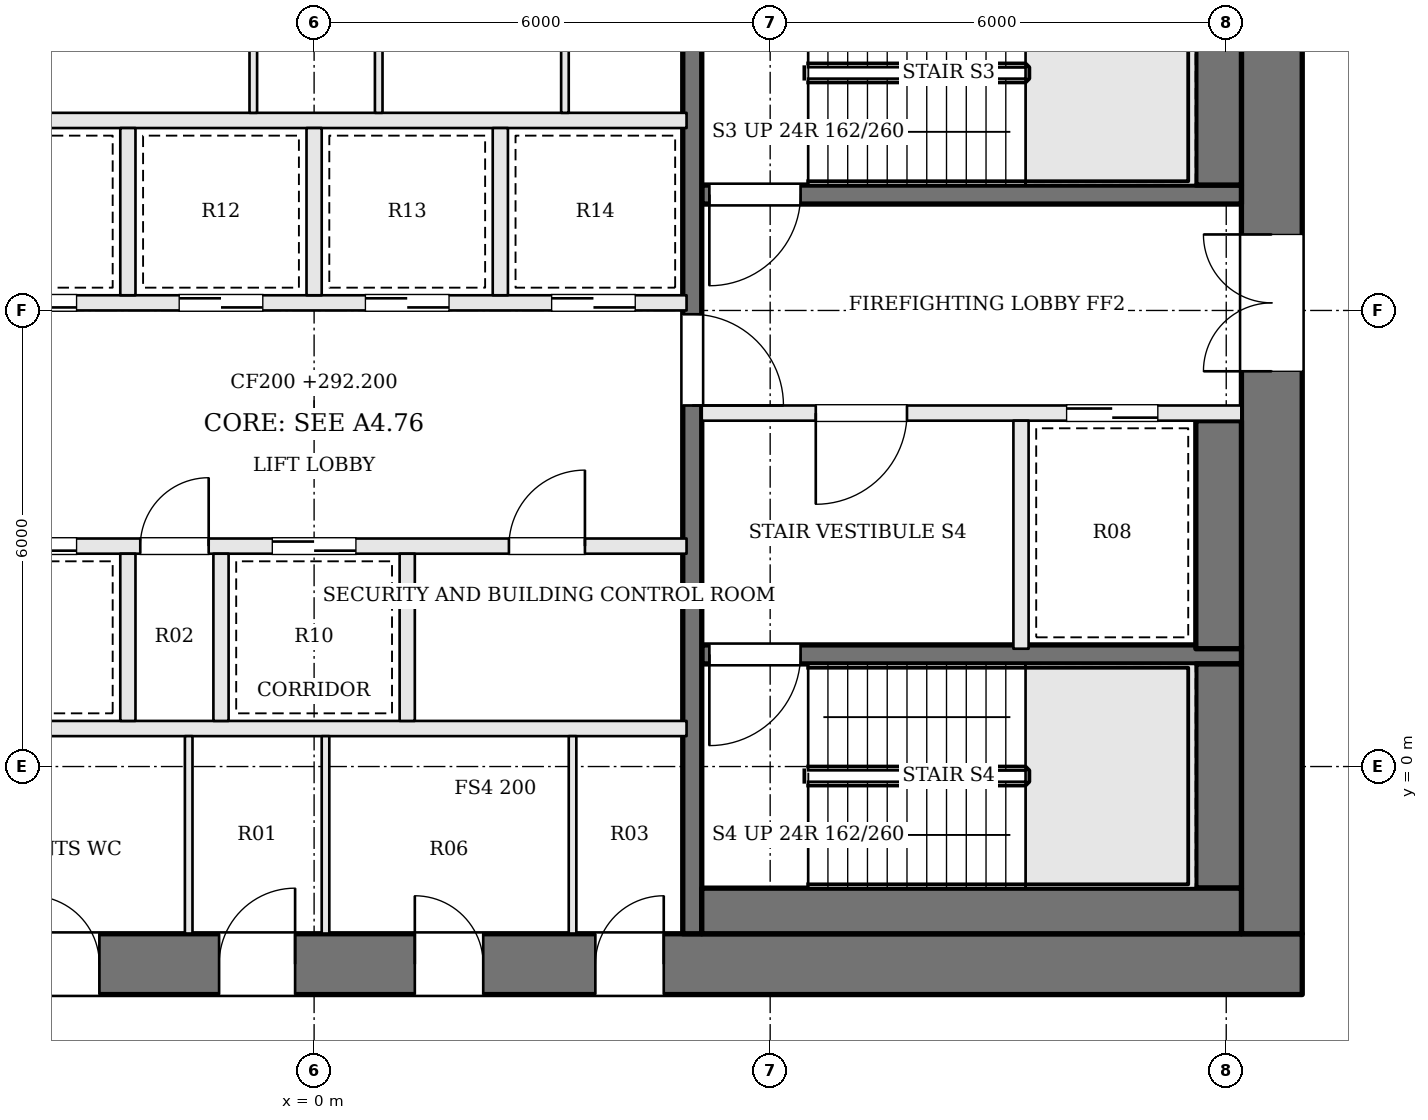
"""IFC4 building model, lengths in metres.
Left out: names, types, materials, properties, quantities, classifications, styles, units other than length and angle.
Written with IfcOpenShell. Run it as: python <this file> out.ifc"""

import sys

from ifc_helpers import new_model, si_unit, direction, frame, frame_2d, origin, place, context, subcontext, project, spatial, rectangle, extrude, element, fill, save


model = new_model("IFC4")
c1 = context("Model", 3, precision=1e-05, world=origin(), true_north=direction((0.0, 1.0)))
c2 = subcontext(c1, "Body", "Model", "MODEL_VIEW")
j1 = project(units=[si_unit("LENGTHUNIT", "METRE"), si_unit("PLANEANGLEUNIT", "RADIAN")], contexts=[c1])
p1 = place(None, origin())
s1 = spatial("IfcSite", under=j1, at=p1, CompositionType="ELEMENT")
p2 = place(p1, origin())
s2 = spatial("IfcBuilding", under=s1, at=p2, CompositionType="ELEMENT")
p3 = place(p2, frame((0.0, 0.0, 292.2)))
s3 = spatial("IfcBuildingStorey", under=s2, at=p3, CompositionType="ELEMENT", Elevation=292.2)
p4 = place(p3, frame((-13.0, -2.6, 0.0), z_axis=(0.0, 0.0, 1.0), x_axis=(1.0, 0.0, 0.0)))
e1 = element("IfcWall", 1, at=p4, inside=s3, PredefinedType="SHEAR", context=c2, shape_type="SweptSolid", body=[
    extrude(rectangle(XDim=26.0, YDim=0.8, at=frame_2d((13.0, 0.0))), origin(), (0.0, 0.0, 1.0), 3.9),
])
p5 = place(p4, frame((9.275, 0.0, 0.0)))
e2 = element("IfcOpeningElement", 2, at=p5, cuts=e1, PredefinedType="OPENING", context=c2, shape_type="SweptSolid", body=[
    extrude(rectangle(XDim=0.9, YDim=2.1, at=frame_2d((0.45, 1.05))), frame((0.0, 0.41, 0.0), z_axis=(0.0, -1.0, 0.0), x_axis=(1.0, 0.0, 0.0)), (0.0, 0.0, 1.0), 0.82),
])
p6 = place(p4, frame((11.75, 0.0, 0.0)))
e3 = element("IfcOpeningElement", 3, at=p6, cuts=e1, PredefinedType="OPENING", context=c2, shape_type="SweptSolid", body=[
    extrude(rectangle(XDim=1.0, YDim=2.1, at=frame_2d((0.5, 1.05))), frame((0.0, 0.41, 0.0), z_axis=(0.0, -1.0, 0.0), x_axis=(1.0, 0.0, 0.0)), (0.0, 0.0, 1.0), 0.82),
])
p7 = place(p4, frame((14.325, 0.0, 0.0)))
e4 = element("IfcOpeningElement", 4, at=p7, cuts=e1, PredefinedType="OPENING", context=c2, shape_type="SweptSolid", body=[
    extrude(rectangle(XDim=0.9, YDim=2.1, at=frame_2d((0.45, 1.05))), frame((0.0, 0.41, 0.0), z_axis=(0.0, -1.0, 0.0), x_axis=(1.0, 0.0, 0.0)), (0.0, 0.0, 1.0), 0.82),
])
p8 = place(p4, frame((16.7, 0.0, 0.0)))
e5 = element("IfcOpeningElement", 5, at=p8, cuts=e1, PredefinedType="OPENING", context=c2, shape_type="SweptSolid", body=[
    extrude(rectangle(XDim=0.9, YDim=2.1, at=frame_2d((0.45, 1.05))), frame((0.0, 0.41, 0.0), z_axis=(0.0, -1.0, 0.0), x_axis=(1.0, 0.0, 0.0)), (0.0, 0.0, 1.0), 0.82),
])
p9 = place(p3, frame((12.6, -2.2, 0.0), z_axis=(0.0, 0.0, 1.0), x_axis=(0.0, 1.0, 0.0)))
e6 = element("IfcWall", 6, at=p9, inside=s3, PredefinedType="SHEAR", context=c2, shape_type="SweptSolid", body=[
    extrude(rectangle(XDim=13.4, YDim=0.8, at=frame_2d((6.7, 0.0))), origin(), (0.0, 0.0, 1.0), 3.9),
])
p10 = place(p9, frame((7.4, 0.0, 0.0)))
e7 = element("IfcOpeningElement", 7, at=p10, cuts=e6, PredefinedType="OPENING", context=c2, shape_type="SweptSolid", body=[
    extrude(rectangle(XDim=1.8, YDim=2.1, at=frame_2d((0.9, 1.05))), frame((0.0, 0.41, 0.0), z_axis=(0.0, -1.0, 0.0), x_axis=(1.0, 0.0, 0.0)), (0.0, 0.0, 1.0), 0.82),
])
p11 = place(p3, frame((12.2, 7.525, 0.0), z_axis=(0.0, 0.0, 1.0), x_axis=(-1.0, 0.0, 0.0)))
e8 = element("IfcWall", 8, at=p11, inside=s3, PredefinedType="SOLIDWALL", context=c2, shape_type="SweptSolid", body=[
    extrude(rectangle(XDim=7.1, YDim=0.25, at=frame_2d((3.55, 0.0))), origin(), (0.0, 0.0, 1.0), 3.7),
])
p12 = place(p11, frame((5.8, 0.0, 0.0)))
e9 = element("IfcOpeningElement", 9, at=p12, cuts=e8, PredefinedType="OPENING", context=c2, shape_type="SweptSolid", body=[
    extrude(rectangle(XDim=1.2, YDim=2.1, at=frame_2d((0.6, 1.05))), frame((0.0, 0.135, 0.0), z_axis=(0.0, -1.0, 0.0), x_axis=(1.0, 0.0, 0.0)), (0.0, 0.0, 1.0), 0.27),
])
p13 = place(p3, frame((12.2, 4.65, 0.0), z_axis=(0.0, 0.0, 1.0), x_axis=(-1.0, 0.0, 0.0)))
e10 = element("IfcWall", 10, at=p13, inside=s3, PredefinedType="SOLIDWALL", context=c2, shape_type="SweptSolid", body=[
    extrude(rectangle(XDim=7.1, YDim=0.2, at=frame_2d((3.55, 0.0))), origin(), (0.0, 0.0, 1.0), 3.7),
])
p14 = place(p13, frame((4.4, 0.0, 0.0)))
e11 = element("IfcOpeningElement", 11, at=p14, cuts=e10, PredefinedType="OPENING", context=c2, shape_type="SweptSolid", body=[
    extrude(rectangle(XDim=1.2, YDim=2.1, at=frame_2d((0.6, 1.05))), frame((0.0, 0.11, 0.0), z_axis=(0.0, -1.0, 0.0), x_axis=(1.0, 0.0, 0.0)), (0.0, 0.0, 1.0), 0.22),
])
p15 = place(p13, frame((1.1, 0.0, 0.0)))
e12 = element("IfcOpeningElement", 12, at=p15, cuts=e10, PredefinedType="OPENING", context=c2, shape_type="SweptSolid", body=[
    extrude(rectangle(XDim=1.2, YDim=2.1, at=frame_2d((0.6, 1.05))), frame((0.0, 0.11, 0.0), z_axis=(0.0, -1.0, 0.0), x_axis=(1.0, 0.0, 0.0)), (0.0, 0.0, 1.0), 0.22),
])
p16 = place(p3, frame((12.2, 1.475, 0.0), z_axis=(0.0, 0.0, 1.0), x_axis=(-1.0, 0.0, 0.0)))
e13 = element("IfcWall", 13, at=p16, inside=s3, PredefinedType="SOLIDWALL", context=c2, shape_type="SweptSolid", body=[
    extrude(rectangle(XDim=7.1, YDim=0.25, at=frame_2d((3.55, 0.0))), origin(), (0.0, 0.0, 1.0), 3.7),
])
p17 = place(p16, frame((5.8, 0.0, 0.0)))
e14 = element("IfcOpeningElement", 14, at=p17, cuts=e13, PredefinedType="OPENING", context=c2, shape_type="SweptSolid", body=[
    extrude(rectangle(XDim=1.2, YDim=2.1, at=frame_2d((0.6, 1.05))), frame((0.0, 0.135, 0.0), z_axis=(0.0, -1.0, 0.0), x_axis=(1.0, 0.0, 0.0)), (0.0, 0.0, 1.0), 0.27),
])
p18 = place(p3, frame((9.3, 4.55, 0.0), z_axis=(0.0, 0.0, 1.0), x_axis=(0.0, -1.0, 0.0)))
e15 = element("IfcWall", 15, at=p18, inside=s3, PredefinedType="SOLIDWALL", context=c2, shape_type="SweptSolid", body=[
    extrude(rectangle(XDim=3.0, YDim=0.2, at=frame_2d((1.5, 0.0))), origin(), (0.0, 0.0, 1.0), 3.7),
])
p19 = place(p3, frame((4.975, 11.2, 0.0), z_axis=(0.0, 0.0, 1.0), x_axis=(0.0, -1.0, 0.0)))
e16 = element("IfcWall", 16, at=p19, inside=s3, PredefinedType="SOLIDWALL", context=c2, shape_type="SweptSolid", body=[
    extrude(rectangle(XDim=13.4, YDim=0.25, at=frame_2d((6.7, 0.0))), origin(), (0.0, 0.0, 1.0), 3.7),
])
p20 = place(p19, frame((5.25, 0.0, 0.0)))
e17 = element("IfcOpeningElement", 17, at=p20, cuts=e16, PredefinedType="OPENING", context=c2, shape_type="SweptSolid", body=[
    extrude(rectangle(XDim=1.2, YDim=2.1, at=frame_2d((0.6, 1.05))), frame((0.0, 0.135, 0.0), z_axis=(0.0, -1.0, 0.0), x_axis=(1.0, 0.0, 0.0)), (0.0, 0.0, 1.0), 0.27),
])
p21 = place(p3, frame((11.9, 10.6, 0.0), z_axis=(0.0, 0.0, 1.0), x_axis=(0.0, -1.0, 0.0)))
e18 = element("IfcWall", 18, at=p21, inside=s3, PredefinedType="SOLIDWALL", context=c2, shape_type="SweptSolid", body=[
    extrude(rectangle(XDim=2.95, YDim=0.6, at=frame_2d((1.475, 0.0))), origin(), (0.0, 0.0, 1.0), 3.7),
])
p22 = place(p3, frame((11.9, 4.55, 0.0), z_axis=(0.0, 0.0, 1.0), x_axis=(0.0, -1.0, 0.0)))
e19 = element("IfcWall", 19, at=p22, inside=s3, PredefinedType="SOLIDWALL", context=c2, shape_type="SweptSolid", body=[
    extrude(rectangle(XDim=3.0, YDim=0.6, at=frame_2d((1.5, 0.0))), origin(), (0.0, 0.0, 1.0), 3.7),
])
p23 = place(p3, frame((11.9, 1.35, 0.0), z_axis=(0.0, 0.0, 1.0), x_axis=(0.0, -1.0, 0.0)))
e20 = element("IfcWall", 20, at=p23, inside=s3, PredefinedType="SOLIDWALL", context=c2, shape_type="SweptSolid", body=[
    extrude(rectangle(XDim=2.95, YDim=0.6, at=frame_2d((1.475, 0.0))), origin(), (0.0, 0.0, 1.0), 3.7),
])
p24 = place(p3, frame((12.2, -1.9, 0.0), z_axis=(0.0, 0.0, 1.0), x_axis=(-1.0, 0.0, 0.0)))
e21 = element("IfcWall", 21, at=p24, inside=s3, PredefinedType="SOLIDWALL", context=c2, shape_type="SweptSolid", body=[
    extrude(rectangle(XDim=7.1, YDim=0.6, at=frame_2d((3.55, 0.0))), origin(), (0.0, 0.0, 1.0), 3.7),
])
p25 = place(p3, frame((-4.9, 0.5, 0.0), z_axis=(0.0, 0.0, 1.0), x_axis=(1.0, 0.0, 0.0)))
e22 = element("IfcWall", 22, at=p25, inside=s3, PredefinedType="SOLIDWALL", context=c2, shape_type="SweptSolid", body=[
    extrude(rectangle(XDim=9.8, YDim=0.2, at=frame_2d((4.9, 0.0))), origin(), (0.0, 0.0, 1.0), 3.7),
])
p26 = place(p3, frame((-4.9, 2.9, 0.0), z_axis=(0.0, 0.0, 1.0), x_axis=(1.0, 0.0, 0.0)))
e23 = element("IfcWall", 23, at=p26, inside=s3, PredefinedType="SOLIDWALL", context=c2, shape_type="SweptSolid", body=[
    extrude(rectangle(XDim=9.8, YDim=0.2, at=frame_2d((4.9, 0.0))), origin(), (0.0, 0.0, 1.0), 3.7),
])
p27 = place(p26, frame((0.675, 0.0, 0.0)))
e24 = element("IfcOpeningElement", 24, at=p27, cuts=e23, PredefinedType="OPENING", context=c2, shape_type="SweptSolid", body=[
    extrude(rectangle(XDim=1.1, YDim=2.1, at=frame_2d((0.55, 1.05))), frame((0.0, 0.11, 0.0), z_axis=(0.0, -1.0, 0.0), x_axis=(1.0, 0.0, 0.0)), (0.0, 0.0, 1.0), 0.22),
])
p28 = place(p26, frame((2.613, 0.0, 0.0)))
e25 = element("IfcOpeningElement", 25, at=p28, cuts=e23, PredefinedType="OPENING", context=c2, shape_type="SweptSolid", body=[
    extrude(rectangle(XDim=0.9, YDim=2.1, at=frame_2d((0.45, 1.05))), frame((0.0, 0.11, 0.0), z_axis=(0.0, -1.0, 0.0), x_axis=(1.0, 0.0, 0.0)), (0.0, 0.0, 1.0), 0.22),
])
p29 = place(p26, frame((4.35, 0.0, 0.0)))
e26 = element("IfcOpeningElement", 26, at=p29, cuts=e23, PredefinedType="OPENING", context=c2, shape_type="SweptSolid", body=[
    extrude(rectangle(XDim=1.1, YDim=2.1, at=frame_2d((0.55, 1.05))), frame((0.0, 0.11, 0.0), z_axis=(0.0, -1.0, 0.0), x_axis=(1.0, 0.0, 0.0)), (0.0, 0.0, 1.0), 0.22),
])
p30 = place(p26, frame((7.463, 0.0, 0.0)))
e27 = element("IfcOpeningElement", 27, at=p30, cuts=e23, PredefinedType="OPENING", context=c2, shape_type="SweptSolid", body=[
    extrude(rectangle(XDim=1.0, YDim=2.1, at=frame_2d((0.5, 1.05))), frame((0.0, 0.11, 0.0), z_axis=(0.0, -1.0, 0.0), x_axis=(1.0, 0.0, 0.0)), (0.0, 0.0, 1.0), 0.22),
])
p31 = place(p3, frame((-4.9, 6.1, 0.0), z_axis=(0.0, 0.0, 1.0), x_axis=(1.0, 0.0, 0.0)))
e28 = element("IfcWall", 28, at=p31, inside=s3, PredefinedType="SOLIDWALL", context=c2, shape_type="SweptSolid", body=[
    extrude(rectangle(XDim=9.8, YDim=0.2, at=frame_2d((4.9, 0.0))), origin(), (0.0, 0.0, 1.0), 3.7),
])
p32 = place(p31, frame((0.675, 0.0, 0.0)))
e29 = element("IfcOpeningElement", 29, at=p32, cuts=e28, PredefinedType="OPENING", context=c2, shape_type="SweptSolid", body=[
    extrude(rectangle(XDim=1.1, YDim=2.1, at=frame_2d((0.55, 1.05))), frame((0.0, 0.11, 0.0), z_axis=(0.0, -1.0, 0.0), x_axis=(1.0, 0.0, 0.0)), (0.0, 0.0, 1.0), 0.22),
])
p33 = place(p31, frame((3.125, 0.0, 0.0)))
e30 = element("IfcOpeningElement", 30, at=p33, cuts=e28, PredefinedType="OPENING", context=c2, shape_type="SweptSolid", body=[
    extrude(rectangle(XDim=1.1, YDim=2.1, at=frame_2d((0.55, 1.05))), frame((0.0, 0.11, 0.0), z_axis=(0.0, -1.0, 0.0), x_axis=(1.0, 0.0, 0.0)), (0.0, 0.0, 1.0), 0.22),
])
p34 = place(p31, frame((5.575, 0.0, 0.0)))
e31 = element("IfcOpeningElement", 31, at=p34, cuts=e28, PredefinedType="OPENING", context=c2, shape_type="SweptSolid", body=[
    extrude(rectangle(XDim=1.1, YDim=2.1, at=frame_2d((0.55, 1.05))), frame((0.0, 0.11, 0.0), z_axis=(0.0, -1.0, 0.0), x_axis=(1.0, 0.0, 0.0)), (0.0, 0.0, 1.0), 0.22),
])
p35 = place(p31, frame((8.025, 0.0, 0.0)))
e32 = element("IfcOpeningElement", 32, at=p35, cuts=e28, PredefinedType="OPENING", context=c2, shape_type="SweptSolid", body=[
    extrude(rectangle(XDim=1.1, YDim=2.1, at=frame_2d((0.55, 1.05))), frame((0.0, 0.11, 0.0), z_axis=(0.0, -1.0, 0.0), x_axis=(1.0, 0.0, 0.0)), (0.0, 0.0, 1.0), 0.22),
])
p36 = place(p3, frame((-4.9, 8.5, 0.0), z_axis=(0.0, 0.0, 1.0), x_axis=(1.0, 0.0, 0.0)))
e33 = element("IfcWall", 33, at=p36, inside=s3, PredefinedType="SOLIDWALL", context=c2, shape_type="SweptSolid", body=[
    extrude(rectangle(XDim=9.8, YDim=0.2, at=frame_2d((4.9, 0.0))), origin(), (0.0, 0.0, 1.0), 3.7),
])
for number, where, z_axis, x_axis in (
    (34, (-2.45, 0.6, 0.0), (0.0, 0.0, 1.0), (0.0, 1.0, 0.0)),
    (35, (-1.225, 0.6, 0.0), (0.0, 0.0, 1.0), (0.0, 1.0, 0.0)),
    (36, (1.225, 0.6, 0.0), (0.0, 0.0, 1.0), (0.0, 1.0, 0.0)),
    (37, (-2.45, 6.2, 0.0), (0.0, 0.0, 1.0), (0.0, 1.0, 0.0)),
    (38, (0.0, 6.2, 0.0), (0.0, 0.0, 1.0), (0.0, 1.0, 0.0)),
    (39, (2.45, 6.2, 0.0), (0.0, 0.0, 1.0), (0.0, 1.0, 0.0)),
):
    element("IfcWall", number, at=place(p3, frame(where, z_axis=z_axis, x_axis=x_axis)), inside=s3, PredefinedType="SOLIDWALL", context=c2, shape_type="SweptSolid", body=[
        extrude(rectangle(XDim=2.2, YDim=0.2, at=frame_2d((1.1, 0.0))), origin(), (0.0, 0.0, 1.0), 3.7),
    ])
for number, where, z_axis, x_axis in (
    (40, (-1.65, -2.2, 0.0), (0.0, 0.0, 1.0), (0.0, 1.0, 0.0)),
    (41, (0.15, -2.2, 0.0), (0.0, 0.0, 1.0), (0.0, 1.0, 0.0)),
    (42, (3.4, -2.2, 0.0), (0.0, 0.0, 1.0), (0.0, 1.0, 0.0)),
    (43, (-0.8, 8.6, 0.0), (0.0, 0.0, 1.0), (0.0, 1.0, 0.0)),
    (44, (0.85, 8.6, 0.0), (0.0, 0.0, 1.0), (0.0, 1.0, 0.0)),
    (45, (3.3, 8.6, 0.0), (0.0, 0.0, 1.0), (0.0, 1.0, 0.0)),
):
    element("IfcWall", number, at=place(p3, frame(where, z_axis=z_axis, x_axis=x_axis)), inside=s3, PredefinedType="PARTITIONING", context=c2, shape_type="SweptSolid", body=[
        extrude(rectangle(XDim=2.6, YDim=0.1, at=frame_2d((1.3, 0.0))), origin(), (0.0, 0.0, 1.0), 3.7),
    ])
p37 = place(p10, origin())
e46 = element("IfcDoor", 46, at=p37, inside=s3, OperationType="DOUBLE_DOOR_SINGLE_SWING", PredefinedType="DOOR", context=c2, shape_type="SweptSolid", body=[
    extrude(rectangle(XDim=1.8, YDim=2.1, at=frame_2d((0.9, 1.05))), frame((0.0, 0.025, 0.0), z_axis=(0.0, -1.0, 0.0), x_axis=(1.0, 0.0, 0.0)), (0.0, 0.0, 1.0), 0.05),
])
fill(e7, e46)
p38 = place(p20, origin())
e47 = element("IfcDoor", 47, at=p38, inside=s3, OperationType="SINGLE_SWING_RIGHT", PredefinedType="DOOR", context=c2, shape_type="SweptSolid", body=[
    extrude(rectangle(XDim=1.2, YDim=2.1, at=frame_2d((0.6, 1.05))), frame((0.0, 0.025, 0.0), z_axis=(0.0, -1.0, 0.0), x_axis=(1.0, 0.0, 0.0)), (0.0, 0.0, 1.0), 0.05),
])
fill(e17, e47)
p39 = place(p14, origin())
e48 = element("IfcDoor", 48, at=p39, inside=s3, OperationType="SINGLE_SWING_RIGHT", PredefinedType="DOOR", context=c2, shape_type="SweptSolid", body=[
    extrude(rectangle(XDim=1.2, YDim=2.1, at=frame_2d((0.6, 1.05))), frame((0.0, 0.025, 0.0), z_axis=(0.0, -1.0, 0.0), x_axis=(1.0, 0.0, 0.0)), (0.0, 0.0, 1.0), 0.05),
])
fill(e11, e48)
p40 = place(p12, origin())
e49 = element("IfcDoor", 49, at=p40, inside=s3, OperationType="SINGLE_SWING_RIGHT", PredefinedType="DOOR", context=c2, shape_type="SweptSolid", body=[
    extrude(rectangle(XDim=1.2, YDim=2.1, at=frame_2d((0.6, 1.05))), frame((0.0, 0.025, 0.0), z_axis=(0.0, -1.0, 0.0), x_axis=(1.0, 0.0, 0.0)), (0.0, 0.0, 1.0), 0.05),
])
fill(e9, e49)
p41 = place(p17, origin())
e50 = element("IfcDoor", 50, at=p41, inside=s3, OperationType="SINGLE_SWING_RIGHT", PredefinedType="DOOR", context=c2, shape_type="SweptSolid", body=[
    extrude(rectangle(XDim=1.2, YDim=2.1, at=frame_2d((0.6, 1.05))), frame((0.0, 0.025, 0.0), z_axis=(0.0, -1.0, 0.0), x_axis=(1.0, 0.0, 0.0)), (0.0, 0.0, 1.0), 0.05),
])
fill(e14, e50)
p42 = place(p15, origin())
e51 = element("IfcDoor", 51, at=p42, inside=s3, OperationType="SLIDING_TO_RIGHT", PredefinedType="DOOR", context=c2, shape_type="SweptSolid", body=[
    extrude(rectangle(XDim=1.2, YDim=2.1, at=frame_2d((0.6, 1.05))), frame((0.0, 0.025, 0.0), z_axis=(0.0, -1.0, 0.0), x_axis=(1.0, 0.0, 0.0)), (0.0, 0.0, 1.0), 0.05),
])
fill(e12, e51)
p43 = place(p27, origin())
e52 = element("IfcDoor", 52, at=p43, inside=s3, OperationType="SLIDING_TO_RIGHT", PredefinedType="DOOR", context=c2, shape_type="SweptSolid", body=[
    extrude(rectangle(XDim=1.1, YDim=2.1, at=frame_2d((0.55, 1.05))), frame((0.0, 0.025, 0.0), z_axis=(0.0, -1.0, 0.0), x_axis=(1.0, 0.0, 0.0)), (0.0, 0.0, 1.0), 0.05),
])
fill(e24, e52)
p44 = place(p28, origin())
e53 = element("IfcDoor", 53, at=p44, inside=s3, OperationType="SINGLE_SWING_RIGHT", PredefinedType="DOOR", context=c2, shape_type="SweptSolid", body=[
    extrude(rectangle(XDim=0.9, YDim=2.1, at=frame_2d((0.45, 1.05))), frame((0.0, 0.025, 0.0), z_axis=(0.0, -1.0, 0.0), x_axis=(1.0, 0.0, 0.0)), (0.0, 0.0, 1.0), 0.05),
])
fill(e25, e53)
p45 = place(p29, origin())
e54 = element("IfcDoor", 54, at=p45, inside=s3, OperationType="SLIDING_TO_LEFT", PredefinedType="DOOR", context=c2, shape_type="SweptSolid", body=[
    extrude(rectangle(XDim=1.1, YDim=2.1, at=frame_2d((0.55, 1.05))), frame((0.0, 0.025, 0.0), z_axis=(0.0, -1.0, 0.0), x_axis=(1.0, 0.0, 0.0)), (0.0, 0.0, 1.0), 0.05),
])
fill(e26, e54)
p46 = place(p30, origin())
e55 = element("IfcDoor", 55, at=p46, inside=s3, OperationType="SINGLE_SWING_RIGHT", PredefinedType="DOOR", context=c2, shape_type="SweptSolid", body=[
    extrude(rectangle(XDim=1.0, YDim=2.1, at=frame_2d((0.5, 1.05))), frame((0.0, 0.025, 0.0), z_axis=(0.0, -1.0, 0.0), x_axis=(1.0, 0.0, 0.0)), (0.0, 0.0, 1.0), 0.05),
])
fill(e27, e55)
p47 = place(p32, origin())
e56 = element("IfcDoor", 56, at=p47, inside=s3, OperationType="SLIDING_TO_RIGHT", PredefinedType="DOOR", context=c2, shape_type="SweptSolid", body=[
    extrude(rectangle(XDim=1.1, YDim=2.1, at=frame_2d((0.55, 1.05))), frame((0.0, 0.025, 0.0), z_axis=(0.0, -1.0, 0.0), x_axis=(1.0, 0.0, 0.0)), (0.0, 0.0, 1.0), 0.05),
])
fill(e29, e56)
p48 = place(p33, origin())
e57 = element("IfcDoor", 57, at=p48, inside=s3, OperationType="SLIDING_TO_LEFT", PredefinedType="DOOR", context=c2, shape_type="SweptSolid", body=[
    extrude(rectangle(XDim=1.1, YDim=2.1, at=frame_2d((0.55, 1.05))), frame((0.0, 0.025, 0.0), z_axis=(0.0, -1.0, 0.0), x_axis=(1.0, 0.0, 0.0)), (0.0, 0.0, 1.0), 0.05),
])
fill(e30, e57)
p49 = place(p34, origin())
e58 = element("IfcDoor", 58, at=p49, inside=s3, OperationType="SLIDING_TO_RIGHT", PredefinedType="DOOR", context=c2, shape_type="SweptSolid", body=[
    extrude(rectangle(XDim=1.1, YDim=2.1, at=frame_2d((0.55, 1.05))), frame((0.0, 0.025, 0.0), z_axis=(0.0, -1.0, 0.0), x_axis=(1.0, 0.0, 0.0)), (0.0, 0.0, 1.0), 0.05),
])
fill(e31, e58)
p50 = place(p35, origin())
e59 = element("IfcDoor", 59, at=p50, inside=s3, OperationType="SLIDING_TO_LEFT", PredefinedType="DOOR", context=c2, shape_type="SweptSolid", body=[
    extrude(rectangle(XDim=1.1, YDim=2.1, at=frame_2d((0.55, 1.05))), frame((0.0, 0.025, 0.0), z_axis=(0.0, -1.0, 0.0), x_axis=(1.0, 0.0, 0.0)), (0.0, 0.0, 1.0), 0.05),
])
fill(e32, e59)
p51 = place(p5, origin())
e60 = element("IfcDoor", 60, at=p51, inside=s3, OperationType="SINGLE_SWING_LEFT", PredefinedType="DOOR", context=c2, shape_type="SweptSolid", body=[
    extrude(rectangle(XDim=0.9, YDim=2.1, at=frame_2d((0.45, 1.05))), frame((0.0, 0.025, 0.0), z_axis=(0.0, -1.0, 0.0), x_axis=(1.0, 0.0, 0.0)), (0.0, 0.0, 1.0), 0.05),
])
fill(e2, e60)
p52 = place(p6, origin())
e61 = element("IfcDoor", 61, at=p52, inside=s3, OperationType="SINGLE_SWING_RIGHT", PredefinedType="DOOR", context=c2, shape_type="SweptSolid", body=[
    extrude(rectangle(XDim=1.0, YDim=2.1, at=frame_2d((0.5, 1.05))), frame((0.0, 0.025, 0.0), z_axis=(0.0, -1.0, 0.0), x_axis=(1.0, 0.0, 0.0)), (0.0, 0.0, 1.0), 0.05),
])
fill(e3, e61)
p53 = place(p7, origin())
e62 = element("IfcDoor", 62, at=p53, inside=s3, OperationType="SINGLE_SWING_LEFT", PredefinedType="DOOR", context=c2, shape_type="SweptSolid", body=[
    extrude(rectangle(XDim=0.9, YDim=2.1, at=frame_2d((0.45, 1.05))), frame((0.0, 0.025, 0.0), z_axis=(0.0, -1.0, 0.0), x_axis=(1.0, 0.0, 0.0)), (0.0, 0.0, 1.0), 0.05),
])
fill(e4, e62)
p54 = place(p8, origin())
e63 = element("IfcDoor", 63, at=p54, inside=s3, OperationType="SINGLE_SWING_RIGHT", PredefinedType="DOOR", context=c2, shape_type="SweptSolid", body=[
    extrude(rectangle(XDim=0.9, YDim=2.1, at=frame_2d((0.45, 1.05))), frame((0.0, 0.025, 0.0), z_axis=(0.0, -1.0, 0.0), x_axis=(1.0, 0.0, 0.0)), (0.0, 0.0, 1.0), 0.05),
])
fill(e5, e63)
save(model, sys.argv[1])
